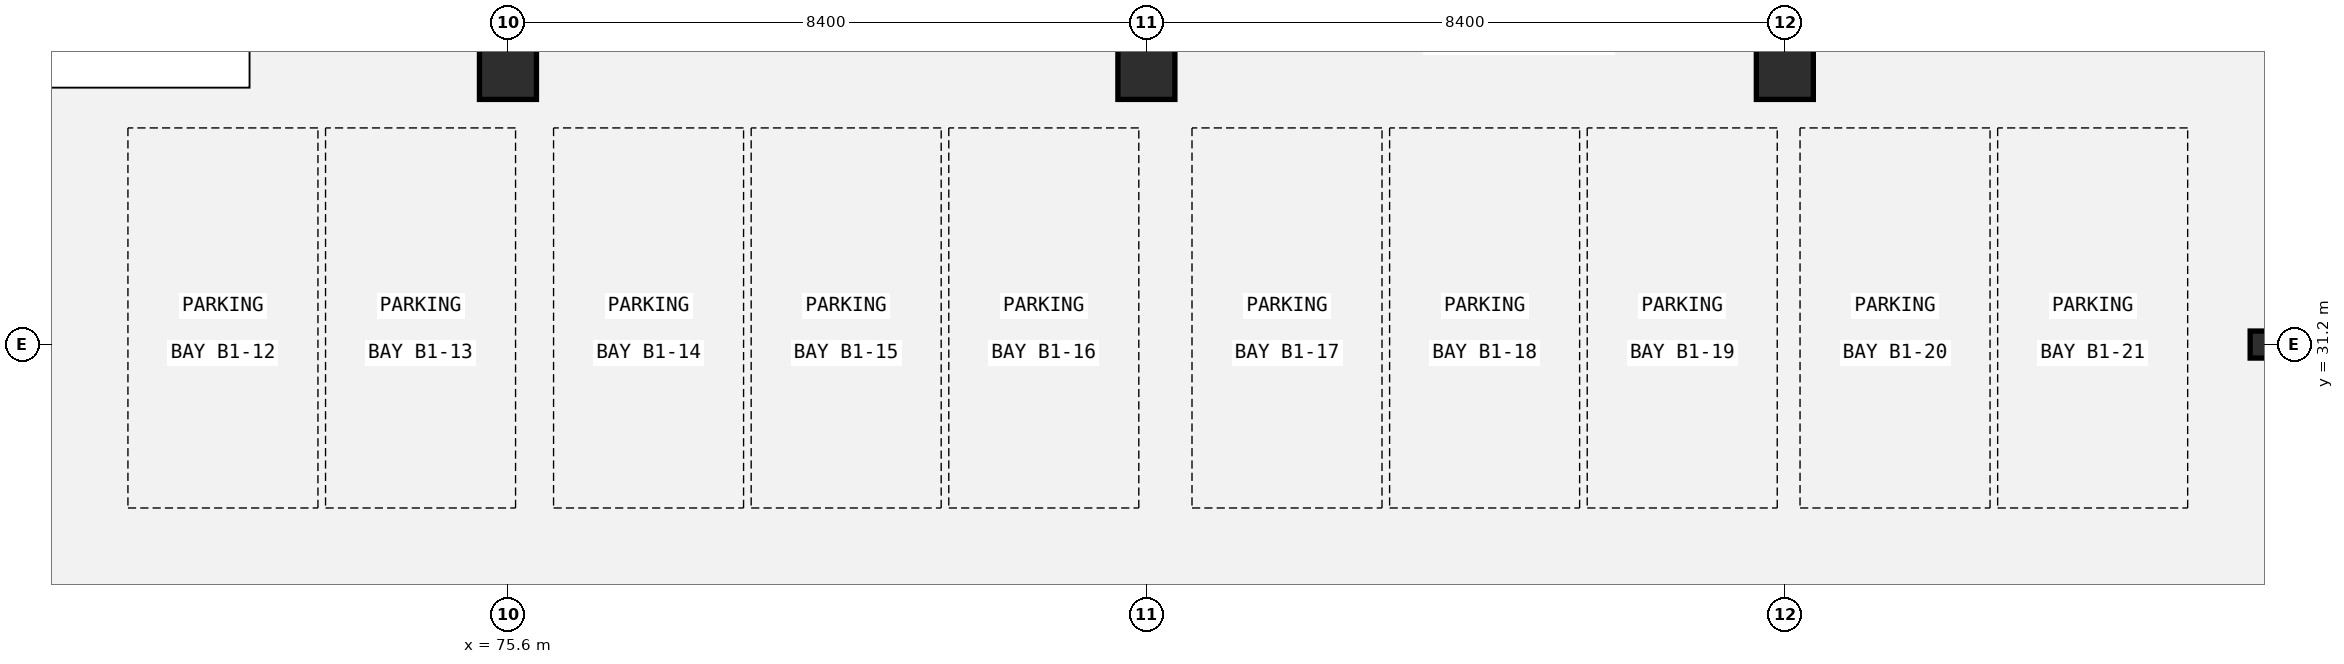
"""IFC4 building model, lengths in metres.
Left out: names, types, materials, properties, quantities, classifications, styles, units other than length and angle.
Written with IfcOpenShell. Run it as: python <this file> out.ifc"""

import sys

from ifc_helpers import new_model, si_unit, direction, frame, origin, origin_2d, place, context, subcontext, project, spatial, rectangle, hollow_circle, extrude, element, save


model = new_model("IFC4")
c1 = context("Model", 3, precision=1e-05, world=origin(), true_north=direction((0.0, 1.0)))
c2 = subcontext(c1, "Body", "Model", "MODEL_VIEW")
j1 = project(units=[si_unit("LENGTHUNIT", "METRE"), si_unit("PLANEANGLEUNIT", "RADIAN")], contexts=[c1])
p1 = place(None, origin())
s1 = spatial("IfcSite", under=j1, at=p1, CompositionType="ELEMENT")
p2 = place(p1, origin())
s2 = spatial("IfcBuilding", under=s1, at=p2, CompositionType="ELEMENT")
p3 = place(p2, frame((0.0, 0.0, -4.5)))
s3 = spatial("IfcBuildingStorey", under=s2, at=p3, CompositionType="ELEMENT", Elevation=-4.5)
for number, where, z_axis, x_axis in (
    (1, (75.6, 34.8, 0.0), (0.0, 0.0, 1.0), (1.0, 0.0, 0.0)),
    (2, (84.0, 34.8, 0.0), (0.0, 0.0, 1.0), (1.0, 0.0, 0.0)),
    (3, (92.4, 34.8, 0.0), (0.0, 0.0, 1.0), (1.0, 0.0, 0.0)),
):
    element("IfcColumn", number, at=place(p3, frame(where, z_axis=z_axis, x_axis=x_axis)), inside=s3, PredefinedType="COLUMN", context=c2, shape_type="SweptSolid", body=[
        extrude(rectangle(XDim=0.75, YDim=0.75, at=origin_2d()), origin(), (0.0, 0.0, 1.0), 4.5),
    ])
p4 = place(p3, frame((98.7, 31.2, 0.0), z_axis=(0.0, 0.0, 1.0), x_axis=(1.0, 0.0, 0.0)))
e4 = element("IfcColumn", 4, at=p4, inside=s3, PredefinedType="COLUMN", context=c2, shape_type="SweptSolid", body=[
    extrude(hollow_circle(Radius=0.178, WallThickness=0.016, at=origin_2d()), origin(), (0.0, 0.0, 1.0), 4.5),
])
save(model, sys.argv[1])
